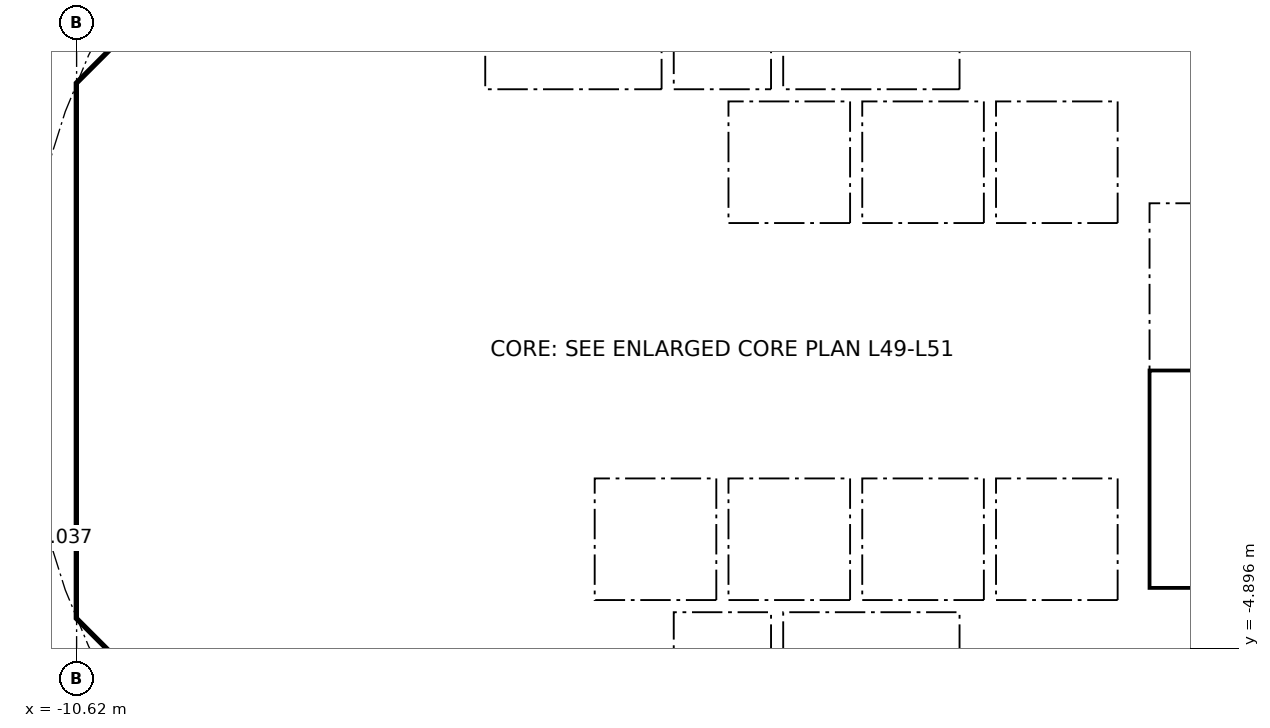
"""IFC4 building model, lengths in metres.
Left out: names, types, materials, properties, quantities, classifications, styles, units other than length and angle.
Written with IfcOpenShell. Run it as: python <this file> out.ifc"""

import sys

from ifc_helpers import new_model, si_unit, direction, frame, frame_2d, origin, place, context, subcontext, project, spatial, polyline, rectangle, outline, extrude, element, fill, save


model = new_model("IFC4")
c1 = context("Model", 3, precision=1e-05, world=origin(), true_north=direction((0.0, 1.0)))
c2 = subcontext(c1, "Body", "Model", "MODEL_VIEW")
j1 = project(units=[si_unit("LENGTHUNIT", "METRE"), si_unit("PLANEANGLEUNIT", "RADIAN")], contexts=[c1])
p1 = place(None, origin())
s1 = spatial("IfcSite", under=j1, at=p1, CompositionType="ELEMENT")
p2 = place(p1, origin())
s2 = spatial("IfcBuilding", under=s1, at=p2, CompositionType="ELEMENT")
p3 = place(p2, frame((0.0, 0.0, 199.2)))
s3 = spatial("IfcBuildingStorey", under=s2, at=p3, CompositionType="ELEMENT", Elevation=199.2)
p4 = place(p3, frame((9.988, 4.613, 0.0), z_axis=(0.0, 0.0, 1.0), x_axis=(-0.707106781187, 0.707106781187, 0.0)))
e1 = element("IfcWall", 1, at=p4, inside=s3, PredefinedType="SHEAR", context=c2, shape_type="SweptSolid", body=[
    extrude(rectangle(XDim=7.602, YDim=0.6, at=frame_2d((3.801, 0.0))), origin(), (0.0, 0.0, 1.0), 3.44),
])
p5 = place(p4, frame((3.201, 0.0, 0.0)))
e2 = element("IfcOpeningElement", 2, at=p5, cuts=e1, PredefinedType="OPENING", context=c2, shape_type="SweptSolid", body=[
    extrude(rectangle(XDim=1.2, YDim=2.1, at=frame_2d((0.6, 1.05))), frame((0.0, 0.31, 0.0), z_axis=(0.0, -1.0, 0.0), x_axis=(1.0, 0.0, 0.0)), (0.0, 0.0, 1.0), 0.62),
])
p6 = place(p3, frame((-4.613, 9.988, 0.0), z_axis=(0.0, 0.0, 1.0), x_axis=(-0.707106781187, -0.707106781187, 0.0)))
e3 = element("IfcWall", 3, at=p6, inside=s3, PredefinedType="SHEAR", context=c2, shape_type="SweptSolid", body=[
    extrude(rectangle(XDim=7.602, YDim=0.6, at=frame_2d((3.801, 0.0))), origin(), (0.0, 0.0, 1.0), 3.44),
])
p7 = place(p6, frame((0.351, 0.0, 0.0)))
e4 = element("IfcOpeningElement", 4, at=p7, cuts=e3, PredefinedType="OPENING", context=c2, shape_type="SweptSolid", body=[
    extrude(rectangle(XDim=1.1, YDim=2.1, at=frame_2d((0.55, 1.05))), frame((0.0, 0.31, 0.0), z_axis=(0.0, -1.0, 0.0), x_axis=(1.0, 0.0, 0.0)), (0.0, 0.0, 1.0), 0.62),
])
p8 = place(p3, frame((-10.325, 3.801, 0.0), z_axis=(0.0, 0.0, 1.0), x_axis=(0.0, -1.0, 0.0)))
e5 = element("IfcWall", 5, at=p8, inside=s3, PredefinedType="SHEAR", context=c2, shape_type="SweptSolid", body=[
    extrude(rectangle(XDim=7.602, YDim=0.6, at=frame_2d((3.801, 0.0))), origin(), (0.0, 0.0, 1.0), 3.44),
])
p9 = place(p8, frame((0.651, 0.0, 0.0)))
e6 = element("IfcOpeningElement", 6, at=p9, cuts=e5, PredefinedType="OPENING", context=c2, shape_type="SweptSolid", body=[
    extrude(rectangle(XDim=1.5, YDim=2.1, at=frame_2d((0.75, 1.05))), frame((0.0, 0.31, 0.0), z_axis=(0.0, -1.0, 0.0), x_axis=(1.0, 0.0, 0.0)), (0.0, 0.0, 1.0), 0.62),
])
p10 = place(p8, frame((5.451, 0.0, 0.0)))
e7 = element("IfcOpeningElement", 7, at=p10, cuts=e5, PredefinedType="OPENING", context=c2, shape_type="SweptSolid", body=[
    extrude(rectangle(XDim=1.5, YDim=2.1, at=frame_2d((0.75, 1.05))), frame((0.0, 0.31, 0.0), z_axis=(0.0, -1.0, 0.0), x_axis=(1.0, 0.0, 0.0)), (0.0, 0.0, 1.0), 0.62),
])
p11 = place(p3, frame((-9.988, -4.613, 0.0), z_axis=(0.0, 0.0, 1.0), x_axis=(0.707106781187, -0.707106781187, 0.0)))
e8 = element("IfcWall", 8, at=p11, inside=s3, PredefinedType="SHEAR", context=c2, shape_type="SweptSolid", body=[
    extrude(rectangle(XDim=7.602, YDim=0.6, at=frame_2d((3.801, 0.0))), origin(), (0.0, 0.0, 1.0), 3.44),
])
p12 = place(p11, frame((6.151, 0.0, 0.0)))
e9 = element("IfcOpeningElement", 9, at=p12, cuts=e8, PredefinedType="OPENING", context=c2, shape_type="SweptSolid", body=[
    extrude(rectangle(XDim=1.1, YDim=2.1, at=frame_2d((0.55, 1.05))), frame((0.0, 0.31, 0.0), z_axis=(0.0, -1.0, 0.0), x_axis=(1.0, 0.0, 0.0)), (0.0, 0.0, 1.0), 0.62),
])
p13 = place(p3, frame((4.613, -9.988, 0.0), z_axis=(0.0, 0.0, 1.0), x_axis=(0.707106781187, 0.707106781187, 0.0)))
e10 = element("IfcWall", 10, at=p13, inside=s3, PredefinedType="SHEAR", context=c2, shape_type="SweptSolid", body=[
    extrude(rectangle(XDim=7.602, YDim=0.6, at=frame_2d((3.801, 0.0))), origin(), (0.0, 0.0, 1.0), 3.44),
])
p14 = place(p13, frame((3.201, 0.0, 0.0)))
e11 = element("IfcOpeningElement", 11, at=p14, cuts=e10, PredefinedType="OPENING", context=c2, shape_type="SweptSolid", body=[
    extrude(rectangle(XDim=1.2, YDim=2.1, at=frame_2d((0.6, 1.05))), frame((0.0, 0.31, 0.0), z_axis=(0.0, -1.0, 0.0), x_axis=(1.0, 0.0, 0.0)), (0.0, 0.0, 1.0), 0.62),
])
p15 = place(p3, frame((-5.8, 4.3, 0.0), z_axis=(0.0, 0.0, 1.0), x_axis=(0.0, 1.0, 0.0)))
e12 = element("IfcWall", 12, at=p15, inside=s3, PredefinedType="PARTITIONING", context=c2, shape_type="SweptSolid", body=[
    extrude(rectangle(XDim=3.927, YDim=0.15, at=frame_2d((1.963, 0.0))), origin(), (0.0, 0.0, 1.0), 3.44),
])
p16 = place(p15, frame((1.551, 0.0, 0.0)))
e13 = element("IfcOpeningElement", 13, at=p16, cuts=e12, PredefinedType="OPENING", context=c2, shape_type="SweptSolid", body=[
    extrude(rectangle(XDim=0.9, YDim=2.1, at=frame_2d((0.45, 1.05))), frame((0.0, 0.085, 0.0), z_axis=(0.0, -1.0, 0.0), x_axis=(1.0, 0.0, 0.0)), (0.0, 0.0, 1.0), 0.17),
])
p17 = place(p3, frame((4.0, 4.3, 0.0), z_axis=(0.0, 0.0, 1.0), x_axis=(0.0, 1.0, 0.0)))
e14 = element("IfcWall", 14, at=p17, inside=s3, PredefinedType="SOLIDWALL", context=c2, shape_type="SweptSolid", body=[
    extrude(rectangle(XDim=2.2, YDim=0.2, at=frame_2d((1.1, 0.0))), origin(), (0.0, 0.0, 1.0), 3.44),
])
p18 = place(p17, frame((0.55, 0.0, 0.0)))
e15 = element("IfcOpeningElement", 15, at=p18, cuts=e14, PredefinedType="OPENING", context=c2, shape_type="SweptSolid", body=[
    extrude(rectangle(XDim=1.1, YDim=2.1, at=frame_2d((0.55, 1.05))), frame((0.0, 0.11, 0.0), z_axis=(0.0, -1.0, 0.0), x_axis=(1.0, 0.0, 0.0)), (0.0, 0.0, 1.0), 0.22),
])
p19 = place(p3, frame((-4.0, 4.3, 0.0), z_axis=(0.0, 0.0, 1.0), x_axis=(0.0, 1.0, 0.0)))
e16 = element("IfcWall", 16, at=p19, inside=s3, PredefinedType="SOLIDWALL", context=c2, shape_type="SweptSolid", body=[
    extrude(rectangle(XDim=2.2, YDim=0.2, at=frame_2d((1.1, 0.0))), origin(), (0.0, 0.0, 1.0), 3.44),
])
p20 = place(p19, frame((0.55, 0.0, 0.0)))
e17 = element("IfcOpeningElement", 17, at=p20, cuts=e16, PredefinedType="OPENING", context=c2, shape_type="SweptSolid", body=[
    extrude(rectangle(XDim=1.1, YDim=2.1, at=frame_2d((0.55, 1.05))), frame((0.0, 0.11, 0.0), z_axis=(0.0, -1.0, 0.0), x_axis=(1.0, 0.0, 0.0)), (0.0, 0.0, 1.0), 0.22),
])
p21 = place(p3, frame((-6.7, 2.0, 0.0), z_axis=(0.0, 0.0, 1.0), x_axis=(1.0, 0.0, 0.0)))
e18 = element("IfcWall", 18, at=p21, inside=s3, PredefinedType="SOLIDWALL", context=c2, shape_type="SweptSolid", body=[
    extrude(rectangle(XDim=13.4, YDim=0.2, at=frame_2d((6.7, 0.0))), origin(), (0.0, 0.0, 1.0), 3.44),
])
p22 = place(p21, frame((7.25, 0.0, 0.0)))
e19 = element("IfcOpeningElement", 19, at=p22, cuts=e18, PredefinedType="OPENING", context=c2, shape_type="SweptSolid", body=[
    extrude(rectangle(XDim=1.1, YDim=2.1, at=frame_2d((0.55, 1.05))), frame((0.0, 0.11, 0.0), z_axis=(0.0, -1.0, 0.0), x_axis=(1.0, 0.0, 0.0)), (0.0, 0.0, 1.0), 0.22),
])
p23 = place(p21, frame((9.45, 0.0, 0.0)))
e20 = element("IfcOpeningElement", 20, at=p23, cuts=e18, PredefinedType="OPENING", context=c2, shape_type="SweptSolid", body=[
    extrude(rectangle(XDim=1.1, YDim=2.1, at=frame_2d((0.55, 1.05))), frame((0.0, 0.11, 0.0), z_axis=(0.0, -1.0, 0.0), x_axis=(1.0, 0.0, 0.0)), (0.0, 0.0, 1.0), 0.22),
])
p24 = place(p21, frame((2.95, 0.0, 0.0)))
e21 = element("IfcOpeningElement", 21, at=p24, cuts=e18, PredefinedType="OPENING", context=c2, shape_type="SweptSolid", body=[
    extrude(rectangle(XDim=0.9, YDim=2.1, at=frame_2d((0.45, 1.05))), frame((0.0, 0.11, 0.0), z_axis=(0.0, -1.0, 0.0), x_axis=(1.0, 0.0, 0.0)), (0.0, 0.0, 1.0), 0.22),
])
p25 = place(p3, frame((6.7, 4.0, 0.0), z_axis=(0.0, 0.0, 1.0), x_axis=(1.0, 0.0, 0.0)))
e22 = element("IfcWall", 22, at=p25, inside=s3, PredefinedType="SOLIDWALL", context=c2, shape_type="SweptSolid", body=[
    extrude(rectangle(XDim=3.325, YDim=0.2, at=frame_2d((1.662, 0.0))), origin(), (0.0, 0.0, 1.0), 3.44),
])
p26 = place(p25, frame((1.25, 0.0, 0.0)))
e23 = element("IfcOpeningElement", 23, at=p26, cuts=e22, PredefinedType="OPENING", context=c2, shape_type="SweptSolid", body=[
    extrude(rectangle(XDim=1.1, YDim=2.1, at=frame_2d((0.55, 1.05))), frame((0.0, 0.11, 0.0), z_axis=(0.0, -1.0, 0.0), x_axis=(1.0, 0.0, 0.0)), (0.0, 0.0, 1.0), 0.22),
])
p27 = place(p3, frame((-6.2, -7.827, 0.0), z_axis=(0.0, 0.0, 1.0), x_axis=(0.0, 1.0, 0.0)))
e24 = element("IfcWall", 24, at=p27, inside=s3, PredefinedType="PARTITIONING", context=c2, shape_type="SweptSolid", body=[
    extrude(rectangle(XDim=3.527, YDim=0.15, at=frame_2d((1.763, 0.0))), origin(), (0.0, 0.0, 1.0), 3.44),
])
p28 = place(p27, frame((2.365, 0.0, 0.0)))
e25 = element("IfcOpeningElement", 25, at=p28, cuts=e24, PredefinedType="OPENING", context=c2, shape_type="SweptSolid", body=[
    extrude(rectangle(XDim=0.9, YDim=2.1, at=frame_2d((0.45, 1.05))), frame((0.0, 0.085, 0.0), z_axis=(0.0, -1.0, 0.0), x_axis=(1.0, 0.0, 0.0)), (0.0, 0.0, 1.0), 0.17),
])
p29 = place(p27, frame((0.489, 0.0, 0.0)))
e26 = element("IfcOpeningElement", 26, at=p29, cuts=e24, PredefinedType="OPENING", context=c2, shape_type="SweptSolid", body=[
    extrude(rectangle(XDim=0.9, YDim=2.1, at=frame_2d((0.45, 1.05))), frame((0.0, 0.085, 0.0), z_axis=(0.0, -1.0, 0.0), x_axis=(1.0, 0.0, 0.0)), (0.0, 0.0, 1.0), 0.17),
])
p30 = place(p3, frame((4.0, -6.5, 0.0), z_axis=(0.0, 0.0, 1.0), x_axis=(0.0, 1.0, 0.0)))
e27 = element("IfcWall", 27, at=p30, inside=s3, PredefinedType="SOLIDWALL", context=c2, shape_type="SweptSolid", body=[
    extrude(rectangle(XDim=2.2, YDim=0.2, at=frame_2d((1.1, 0.0))), origin(), (0.0, 0.0, 1.0), 3.44),
])
p31 = place(p30, frame((0.55, 0.0, 0.0)))
e28 = element("IfcOpeningElement", 28, at=p31, cuts=e27, PredefinedType="OPENING", context=c2, shape_type="SweptSolid", body=[
    extrude(rectangle(XDim=1.1, YDim=2.1, at=frame_2d((0.55, 1.05))), frame((0.0, 0.11, 0.0), z_axis=(0.0, -1.0, 0.0), x_axis=(1.0, 0.0, 0.0)), (0.0, 0.0, 1.0), 0.22),
])
p32 = place(p3, frame((-4.0, -6.5, 0.0), z_axis=(0.0, 0.0, 1.0), x_axis=(0.0, 1.0, 0.0)))
e29 = element("IfcWall", 29, at=p32, inside=s3, PredefinedType="SOLIDWALL", context=c2, shape_type="SweptSolid", body=[
    extrude(rectangle(XDim=2.2, YDim=0.2, at=frame_2d((1.1, 0.0))), origin(), (0.0, 0.0, 1.0), 3.44),
])
p33 = place(p32, frame((0.65, 0.0, 0.0)))
e30 = element("IfcOpeningElement", 30, at=p33, cuts=e29, PredefinedType="OPENING", context=c2, shape_type="SweptSolid", body=[
    extrude(rectangle(XDim=0.9, YDim=2.1, at=frame_2d((0.45, 1.05))), frame((0.0, 0.11, 0.0), z_axis=(0.0, -1.0, 0.0), x_axis=(1.0, 0.0, 0.0)), (0.0, 0.0, 1.0), 0.22),
])
p34 = place(p3, frame((-6.7, -2.0, 0.0), z_axis=(0.0, 0.0, 1.0), x_axis=(1.0, 0.0, 0.0)))
e31 = element("IfcWall", 31, at=p34, inside=s3, PredefinedType="SOLIDWALL", context=c2, shape_type="SweptSolid", body=[
    extrude(rectangle(XDim=13.4, YDim=0.2, at=frame_2d((6.7, 0.0))), origin(), (0.0, 0.0, 1.0), 3.44),
])
p35 = place(p34, frame((5.05, 0.0, 0.0)))
e32 = element("IfcOpeningElement", 32, at=p35, cuts=e31, PredefinedType="OPENING", context=c2, shape_type="SweptSolid", body=[
    extrude(rectangle(XDim=1.1, YDim=2.1, at=frame_2d((0.55, 1.05))), frame((0.0, 0.11, 0.0), z_axis=(0.0, -1.0, 0.0), x_axis=(1.0, 0.0, 0.0)), (0.0, 0.0, 1.0), 0.22),
])
p36 = place(p34, frame((7.25, 0.0, 0.0)))
e33 = element("IfcOpeningElement", 33, at=p36, cuts=e31, PredefinedType="OPENING", context=c2, shape_type="SweptSolid", body=[
    extrude(rectangle(XDim=1.1, YDim=2.1, at=frame_2d((0.55, 1.05))), frame((0.0, 0.11, 0.0), z_axis=(0.0, -1.0, 0.0), x_axis=(1.0, 0.0, 0.0)), (0.0, 0.0, 1.0), 0.22),
])
p37 = place(p34, frame((0.75, 0.0, 0.0)))
e34 = element("IfcOpeningElement", 34, at=p37, cuts=e31, PredefinedType="OPENING", context=c2, shape_type="SweptSolid", body=[
    extrude(rectangle(XDim=0.9, YDim=2.1, at=frame_2d((0.45, 1.05))), frame((0.0, 0.11, 0.0), z_axis=(0.0, -1.0, 0.0), x_axis=(1.0, 0.0, 0.0)), (0.0, 0.0, 1.0), 0.22),
])
p38 = place(p34, frame((2.95, 0.0, 0.0)))
e35 = element("IfcOpeningElement", 35, at=p38, cuts=e31, PredefinedType="OPENING", context=c2, shape_type="SweptSolid", body=[
    extrude(rectangle(XDim=0.9, YDim=2.1, at=frame_2d((0.45, 1.05))), frame((0.0, 0.11, 0.0), z_axis=(0.0, -1.0, 0.0), x_axis=(1.0, 0.0, 0.0)), (0.0, 0.0, 1.0), 0.22),
])
p39 = place(p3, origin())
e36 = element("IfcWall", 36, at=p39, inside=s3, PredefinedType="SHEAR", context=c2, shape_type="SweptSolid", body=[
    extrude(outline(polyline([(-10.625, -3.801), (-10.025, -3.801), (-10.025, -4.152), (-9.776, -4.401), (-10.2, -4.825), (-10.625, -4.401), (-10.625, -3.801)])), origin(), (0.0, 0.0, 1.0), 3.44),
])
p40 = place(p3, origin())
e37 = element("IfcWall", 37, at=p40, inside=s3, PredefinedType="SHEAR", context=c2, shape_type="SweptSolid", body=[
    extrude(outline(polyline([(-10.2, 4.825), (-9.776, 4.401), (-10.025, 4.152), (-10.025, 3.801), (-10.625, 3.801), (-10.625, 4.401), (-10.2, 4.825)])), origin(), (0.0, 0.0, 1.0), 3.44),
])
for number, where, z_axis, x_axis in (
    (38, (-0.9, -6.5, 0.0), (0.0, 0.0, 1.0), (0.0, 1.0, 0.0)),
    (39, (0.9, -6.5, 0.0), (0.0, 0.0, 1.0), (0.0, 1.0, 0.0)),
):
    element("IfcWall", number, at=place(p3, frame(where, z_axis=z_axis, x_axis=x_axis)), inside=s3, PredefinedType="SOLIDWALL", context=c2, shape_type="SweptSolid", body=[
        extrude(rectangle(XDim=2.2, YDim=0.2, at=frame_2d((1.1, 0.0))), origin(), (0.0, 0.0, 1.0), 3.44),
    ])
p41 = place(p3, origin())
e40 = element("IfcWall", 40, at=p41, inside=s3, PredefinedType="SOLIDWALL", context=c2, shape_type="SweptSolid", body=[
    extrude(outline(polyline([(-6.7, -2.1), (-6.5, -2.1), (-6.5, -4.1), (-4.5, -4.1), (-4.5, -2.1), (-4.3, -2.1), (-4.3, -4.1), (-2.3, -4.1), (-2.3, -2.1), (-2.1, -2.1), (-2.1, -4.1), (-0.1, -4.1), (-0.1, -2.1), (0.1, -2.1), (0.1, -4.1), (2.1, -4.1), (2.1, -2.1), (2.3, -2.1), (2.3, -4.1), (4.3, -4.1), (4.3, -2.1), (4.5, -2.1), (4.5, -4.1), (6.5, -4.1), (6.5, -2.1), (6.7, -2.1), (6.7, -4.3), (-6.7, -4.3), (-6.7, -2.1)])), origin(), (0.0, 0.0, 1.0), 3.44),
])
for number, where, z_axis, x_axis in (
    (41, (-0.9, 4.3, 0.0), (0.0, 0.0, 1.0), (0.0, 1.0, 0.0)),
    (42, (0.9, 4.3, 0.0), (0.0, 0.0, 1.0), (0.0, 1.0, 0.0)),
):
    element("IfcWall", number, at=place(p3, frame(where, z_axis=z_axis, x_axis=x_axis)), inside=s3, PredefinedType="SOLIDWALL", context=c2, shape_type="SweptSolid", body=[
        extrude(rectangle(XDim=2.2, YDim=0.2, at=frame_2d((1.1, 0.0))), origin(), (0.0, 0.0, 1.0), 3.44),
    ])
p42 = place(p3, origin())
e43 = element("IfcWall", 43, at=p42, inside=s3, PredefinedType="SOLIDWALL", context=c2, shape_type="SweptSolid", body=[
    extrude(outline(polyline([(-6.7, 4.3), (6.7, 4.3), (6.7, 2.1), (6.5, 2.1), (6.5, 4.1), (4.5, 4.1), (4.5, 2.1), (4.3, 2.1), (4.3, 4.1), (2.3, 4.1), (2.3, 2.1), (2.1, 2.1), (2.1, 4.1), (0.1, 4.1), (0.1, 2.1), (-0.1, 2.1), (-0.1, 4.1), (-6.5, 4.1), (-6.5, 2.1), (-6.7, 2.1), (-6.7, 4.3)])), origin(), (0.0, 0.0, 1.0), 3.44),
])
for number, where, z_axis, x_axis in (
    (44, (-10.025, -4.0, 0.0), (0.0, 0.0, 1.0), (1.0, 0.0, 0.0)),
    (45, (-10.025, 4.0, 0.0), (0.0, 0.0, 1.0), (1.0, 0.0, 0.0)),
):
    element("IfcWall", number, at=place(p3, frame(where, z_axis=z_axis, x_axis=x_axis)), inside=s3, PredefinedType="PARTITIONING", context=c2, shape_type="SweptSolid", body=[
        extrude(rectangle(XDim=3.325, YDim=0.2, at=frame_2d((1.662, 0.0))), origin(), (0.0, 0.0, 1.0), 3.44),
    ])
p43 = place(p3, origin())
e46 = element("IfcWall", 46, at=p43, inside=s3, PredefinedType="SOLIDWALL", context=c2, shape_type="SweptSolid", body=[
    extrude(outline(polyline([(7.025, -3.9), (6.7, -3.9), (6.7, 3.9), (7.025, 3.9), (7.025, -3.9)])), origin(), (0.0, 0.0, 1.0), 3.44),
])
p44 = place(p3, origin())
e47 = element("IfcWall", 47, at=p44, inside=s3, PredefinedType="SOLIDWALL", context=c2, shape_type="SweptSolid", body=[
    extrude(outline(polyline([(10.025, -4.1), (6.7, -4.1), (6.7, -3.9), (10.025, -3.9), (10.025, -4.1)])), origin(), (0.0, 0.0, 1.0), 3.44),
])
p45 = place(p22, origin())
e48 = element("IfcDoor", 48, at=p45, inside=s3, OperationType="DOUBLE_DOOR_SLIDING", PredefinedType="DOOR", context=c2, shape_type="SweptSolid", body=[
    extrude(rectangle(XDim=1.1, YDim=2.1, at=frame_2d((0.55, 1.05))), frame((0.0, 0.025, 0.0), z_axis=(0.0, -1.0, 0.0), x_axis=(1.0, 0.0, 0.0)), (0.0, 0.0, 1.0), 0.05),
])
fill(e19, e48)
p46 = place(p23, origin())
e49 = element("IfcDoor", 49, at=p46, inside=s3, OperationType="DOUBLE_DOOR_SLIDING", PredefinedType="DOOR", context=c2, shape_type="SweptSolid", body=[
    extrude(rectangle(XDim=1.1, YDim=2.1, at=frame_2d((0.55, 1.05))), frame((0.0, 0.025, 0.0), z_axis=(0.0, -1.0, 0.0), x_axis=(1.0, 0.0, 0.0)), (0.0, 0.0, 1.0), 0.05),
])
fill(e20, e49)
p47 = place(p35, origin())
e50 = element("IfcDoor", 50, at=p47, inside=s3, OperationType="DOUBLE_DOOR_SLIDING", PredefinedType="DOOR", context=c2, shape_type="SweptSolid", body=[
    extrude(rectangle(XDim=1.1, YDim=2.1, at=frame_2d((0.55, 1.05))), frame((0.0, 0.025, 0.0), z_axis=(0.0, -1.0, 0.0), x_axis=(1.0, 0.0, 0.0)), (0.0, 0.0, 1.0), 0.05),
])
fill(e32, e50)
p48 = place(p36, origin())
e51 = element("IfcDoor", 51, at=p48, inside=s3, OperationType="DOUBLE_DOOR_SLIDING", PredefinedType="DOOR", context=c2, shape_type="SweptSolid", body=[
    extrude(rectangle(XDim=1.1, YDim=2.1, at=frame_2d((0.55, 1.05))), frame((0.0, 0.025, 0.0), z_axis=(0.0, -1.0, 0.0), x_axis=(1.0, 0.0, 0.0)), (0.0, 0.0, 1.0), 0.05),
])
fill(e33, e51)
p49 = place(p18, origin())
e52 = element("IfcDoor", 52, at=p49, inside=s3, OperationType="DOUBLE_DOOR_SLIDING", PredefinedType="DOOR", context=c2, shape_type="SweptSolid", body=[
    extrude(rectangle(XDim=1.1, YDim=2.1, at=frame_2d((0.55, 1.05))), frame((0.0, 0.025, 0.0), z_axis=(0.0, -1.0, 0.0), x_axis=(1.0, 0.0, 0.0)), (0.0, 0.0, 1.0), 0.05),
])
fill(e15, e52)
p50 = place(p31, origin())
e53 = element("IfcDoor", 53, at=p50, inside=s3, OperationType="DOUBLE_DOOR_SLIDING", PredefinedType="DOOR", context=c2, shape_type="SweptSolid", body=[
    extrude(rectangle(XDim=1.1, YDim=2.1, at=frame_2d((0.55, 1.05))), frame((0.0, 0.025, 0.0), z_axis=(0.0, -1.0, 0.0), x_axis=(1.0, 0.0, 0.0)), (0.0, 0.0, 1.0), 0.05),
])
fill(e28, e53)
p51 = place(p20, origin())
e54 = element("IfcDoor", 54, at=p51, inside=s3, OperationType="DOUBLE_DOOR_SLIDING", PredefinedType="DOOR", context=c2, shape_type="SweptSolid", body=[
    extrude(rectangle(XDim=1.1, YDim=2.1, at=frame_2d((0.55, 1.05))), frame((0.0, 0.025, 0.0), z_axis=(0.0, -1.0, 0.0), x_axis=(1.0, 0.0, 0.0)), (0.0, 0.0, 1.0), 0.05),
])
fill(e17, e54)
p52 = place(p28, origin())
e55 = element("IfcDoor", 55, at=p52, inside=s3, OperationType="SINGLE_SWING_LEFT", PredefinedType="DOOR", context=c2, shape_type="SweptSolid", body=[
    extrude(rectangle(XDim=0.9, YDim=2.1, at=frame_2d((0.45, 1.05))), frame((0.0, 0.025, 0.0), z_axis=(0.0, -1.0, 0.0), x_axis=(1.0, 0.0, 0.0)), (0.0, 0.0, 1.0), 0.05),
])
fill(e25, e55)
p53 = place(p24, origin())
e56 = element("IfcDoor", 56, at=p53, inside=s3, OperationType="SINGLE_SWING_RIGHT", PredefinedType="DOOR", context=c2, shape_type="SweptSolid", body=[
    extrude(rectangle(XDim=0.9, YDim=2.1, at=frame_2d((0.45, 1.05))), frame((0.0, 0.025, 0.0), z_axis=(0.0, -1.0, 0.0), x_axis=(1.0, 0.0, 0.0)), (0.0, 0.0, 1.0), 0.05),
])
fill(e21, e56)
p54 = place(p37, frame((0.9, 0.0, 0.0), x_axis=(-1.0, 0.0, 0.0)))
e57 = element("IfcDoor", 57, at=p54, inside=s3, OperationType="SINGLE_SWING_LEFT", PredefinedType="DOOR", context=c2, shape_type="SweptSolid", body=[
    extrude(rectangle(XDim=0.9, YDim=2.1, at=frame_2d((0.45, 1.05))), frame((0.0, 0.025, 0.0), z_axis=(0.0, -1.0, 0.0), x_axis=(1.0, 0.0, 0.0)), (0.0, 0.0, 1.0), 0.05),
])
fill(e34, e57)
p55 = place(p38, frame((0.9, 0.0, 0.0), x_axis=(-1.0, 0.0, 0.0)))
e58 = element("IfcDoor", 58, at=p55, inside=s3, OperationType="SINGLE_SWING_LEFT", PredefinedType="DOOR", context=c2, shape_type="SweptSolid", body=[
    extrude(rectangle(XDim=0.9, YDim=2.1, at=frame_2d((0.45, 1.05))), frame((0.0, 0.025, 0.0), z_axis=(0.0, -1.0, 0.0), x_axis=(1.0, 0.0, 0.0)), (0.0, 0.0, 1.0), 0.05),
])
fill(e35, e58)
p56 = place(p9, origin())
e59 = element("IfcDoor", 59, at=p56, inside=s3, OperationType="DOUBLE_DOOR_SINGLE_SWING", PredefinedType="DOOR", context=c2, shape_type="SweptSolid", body=[
    extrude(rectangle(XDim=1.5, YDim=2.1, at=frame_2d((0.75, 1.05))), frame((0.0, 0.025, 0.0), z_axis=(0.0, -1.0, 0.0), x_axis=(1.0, 0.0, 0.0)), (0.0, 0.0, 1.0), 0.05),
])
fill(e6, e59)
p57 = place(p10, origin())
e60 = element("IfcDoor", 60, at=p57, inside=s3, OperationType="DOUBLE_DOOR_SINGLE_SWING", PredefinedType="DOOR", context=c2, shape_type="SweptSolid", body=[
    extrude(rectangle(XDim=1.5, YDim=2.1, at=frame_2d((0.75, 1.05))), frame((0.0, 0.025, 0.0), z_axis=(0.0, -1.0, 0.0), x_axis=(1.0, 0.0, 0.0)), (0.0, 0.0, 1.0), 0.05),
])
fill(e7, e60)
save(model, sys.argv[1])
